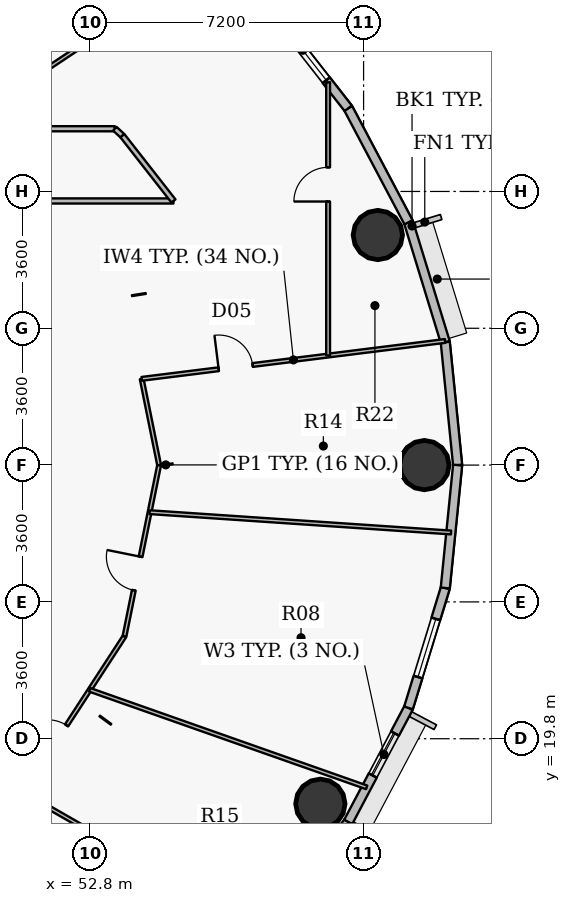
"""IFC4 building model, lengths in metres.
Left out: names, types, materials, properties, quantities, classifications, styles, units other than length and angle.
Written with IfcOpenShell. Run it as: python <this file> out.ifc"""

import sys

from ifc_helpers import new_model, si_unit, direction, frame, frame_2d, origin, origin_2d, place, context, subcontext, project, spatial, rectangle, hollow_circle, extrude, source, transform, mapped, element, fill, save


model = new_model("IFC4")
c1 = context("Model", 3, precision=1e-05, world=origin(), true_north=direction((0.0, 1.0)))
c2 = subcontext(c1, "Body", "Model", "MODEL_VIEW")
j1 = project(units=[si_unit("LENGTHUNIT", "METRE"), si_unit("PLANEANGLEUNIT", "RADIAN")], contexts=[c1])
p1 = place(None, origin())
s1 = spatial("IfcSite", under=j1, at=p1, CompositionType="ELEMENT")
p2 = place(p1, origin())
s2 = spatial("IfcBuilding", under=s1, at=p2, CompositionType="ELEMENT")
p3 = place(p2, frame((0.0, 0.0, 193.65)))
s3 = spatial("IfcBuildingStorey", under=s2, at=p3, CompositionType="ELEMENT", Elevation=193.65)
for number, where, z_axis, x_axis in (
    (1, (61.6, 27.0, 0.0), (0.0, 0.0, 1.0), (1.0, 0.0, 0.0)),
    (2, (60.375, 33.053, 0.0), (0.0, 0.0, 1.0), (1.0, 0.0, 0.0)),
    (3, (58.863, 18.089, 0.0), (0.0, 0.0, 1.0), (1.0, 0.0, 0.0)),
):
    element("IfcColumn", number, at=place(p3, frame(where, z_axis=z_axis, x_axis=x_axis)), inside=s3, PredefinedType="COLUMN", context=c2, shape_type="SweptSolid", body=[
        extrude(hollow_circle(Radius=0.65, WallThickness=0.04, at=origin_2d()), origin(), (0.0, 0.0, 1.0), 3.75),
    ])
p4 = place(p3, frame((62.15, 30.234, 0.0), z_axis=(0.0, 0.0, 1.0), x_axis=(0.100061534614, -0.994981250723, 0.0)))
e4 = element("IfcWall", 4, at=p4, inside=s3, PredefinedType="SOLIDWALL", context=c2, shape_type="SweptSolid", body=[
    extrude(rectangle(XDim=3.25, YDim=0.24, at=frame_2d((1.625, 0.0))), origin(), (0.0, 0.0, 1.0), 3.5),
])
p5 = place(p3, frame((61.183, 33.389, 0.0), z_axis=(0.0, 0.0, 1.0), x_axis=(0.293097995113, -0.956082405058, 0.0)))
e5 = element("IfcWall", 5, at=p5, inside=s3, PredefinedType="SOLIDWALL", context=c2, shape_type="SweptSolid", body=[
    extrude(rectangle(XDim=3.3, YDim=0.24, at=frame_2d((1.65, 0.0))), origin(), (0.0, 0.0, 1.0), 3.5),
])
p6 = place(p3, frame((59.596, 36.388, 0.0), z_axis=(0.0, 0.0, 1.0), x_axis=(0.467586874938, -0.88394712194, 0.0)))
e6 = element("IfcWall", 6, at=p6, inside=s3, PredefinedType="SOLIDWALL", context=c2, shape_type="SweptSolid", body=[
    extrude(rectangle(XDim=3.393, YDim=0.24, at=frame_2d((1.697, 0.0))), origin(), (0.0, 0.0, 1.0), 3.5),
])
p7 = place(p3, frame((57.428, 39.158, 0.0), z_axis=(0.0, 0.0, 1.0), x_axis=(0.616287674549, -0.787521112224, 0.0)))
e7 = element("IfcWall", 7, at=p7, inside=s3, PredefinedType="SOLIDWALL", context=c2, shape_type="SweptSolid", body=[
    extrude(rectangle(XDim=3.517, YDim=0.24, at=frame_2d((1.759, 0.0))), origin(), (0.0, 0.0, 1.0), 3.5),
])
p8 = place(p7, frame((0.579, 0.0, 0.9)))
e8 = element("IfcOpeningElement", 8, at=p8, cuts=e7, PredefinedType="OPENING", context=c2, shape_type="SweptSolid", body=[
    extrude(rectangle(XDim=2.0, YDim=1.75, at=origin_2d()), frame((1.0, 0.13, 0.875), z_axis=(0.0, -1.0, 0.0), x_axis=(1.0, 0.0, 0.0)), (0.0, 0.0, 1.0), 0.26),
])
p9 = place(p3, frame((59.596, 17.612, 0.0), z_axis=(0.0, 0.0, 1.0), x_axis=(-0.616287674549, -0.787521112224, 0.0)))
e9 = element("IfcWall", 9, at=p9, inside=s3, PredefinedType="SOLIDWALL", context=c2, shape_type="SweptSolid", body=[
    extrude(rectangle(XDim=3.517, YDim=0.24, at=frame_2d((1.759, 0.0))), origin(), (0.0, 0.0, 1.0), 3.5),
])
p10 = place(p3, frame((61.183, 20.611, 0.0), z_axis=(0.0, 0.0, 1.0), x_axis=(-0.467586874938, -0.88394712194, 0.0)))
e10 = element("IfcWall", 10, at=p10, inside=s3, PredefinedType="SOLIDWALL", context=c2, shape_type="SweptSolid", body=[
    extrude(rectangle(XDim=3.393, YDim=0.24, at=frame_2d((1.697, 0.0))), origin(), (0.0, 0.0, 1.0), 3.5),
])
p11 = place(p10, frame((0.762, 0.0, 0.9)))
e11 = element("IfcOpeningElement", 11, at=p11, cuts=e10, PredefinedType="OPENING", context=c2, shape_type="SweptSolid", body=[
    extrude(rectangle(XDim=1.25, YDim=1.65, at=origin_2d()), frame((0.625, 0.13, 0.825), z_axis=(0.0, -1.0, 0.0), x_axis=(1.0, 0.0, 0.0)), (0.0, 0.0, 1.0), 0.26),
])
p12 = place(p3, frame((62.15, 23.766, 0.0), z_axis=(0.0, 0.0, 1.0), x_axis=(-0.293097995113, -0.956082405058, 0.0)))
e12 = element("IfcWall", 12, at=p12, inside=s3, PredefinedType="SOLIDWALL", context=c2, shape_type="SweptSolid", body=[
    extrude(rectangle(XDim=3.3, YDim=0.24, at=frame_2d((1.65, 0.0))), origin(), (0.0, 0.0, 1.0), 3.5),
])
p13 = place(p12, frame((0.85, 0.0, 0.9)))
e13 = element("IfcOpeningElement", 13, at=p13, cuts=e12, PredefinedType="OPENING", context=c2, shape_type="SweptSolid", body=[
    extrude(rectangle(XDim=1.6, YDim=1.75, at=origin_2d()), frame((0.8, 0.13, 0.875), z_axis=(0.0, -1.0, 0.0), x_axis=(1.0, 0.0, 0.0)), (0.0, 0.0, 1.0), 0.26),
])
p14 = place(p3, frame((62.475, 27.0, 0.0), z_axis=(0.0, 0.0, 1.0), x_axis=(-0.100061534614, -0.994981250723, 0.0)))
e14 = element("IfcWall", 14, at=p14, inside=s3, PredefinedType="SOLIDWALL", context=c2, shape_type="SweptSolid", body=[
    extrude(rectangle(XDim=3.25, YDim=0.24, at=frame_2d((1.625, 0.0))), origin(), (0.0, 0.0, 1.0), 3.5),
])
p15 = place(p3, frame((38.541, 35.85, 0.0), z_axis=(0.0, 0.0, 1.0), x_axis=(1.0, 0.0, 0.0)))
e15 = element("IfcWall", 15, at=p15, inside=s3, PredefinedType="PARTITIONING", context=c2, shape_type="SweptSolid", body=[
    extrude(rectangle(XDim=14.913, YDim=0.135, at=frame_2d((7.456, 0.0))), origin(), (0.0, 0.0, 1.0), 2.935),
])
p16 = place(p15, frame((9.46, 0.0, 0.0)))
e16 = element("IfcOpeningElement", 16, at=p16, cuts=e15, PredefinedType="OPENING", context=c2, shape_type="SweptSolid", body=[
    extrude(rectangle(XDim=1.0, YDim=2.15, at=origin_2d()), frame((0.5, 0.078, 1.075), z_axis=(0.0, -1.0, 0.0), x_axis=(1.0, 0.0, 0.0)), (0.0, 0.0, 1.0), 0.155),
])
p17 = place(p3, frame((44.571, 18.15, 0.0), z_axis=(0.0, 0.0, 1.0), x_axis=(0.695670435579, -0.718361082647, 0.0)))
e17 = element("IfcWall", 17, at=p17, inside=s3, PredefinedType="PARTITIONING", context=c2, shape_type="SweptSolid", body=[
    extrude(rectangle(XDim=10.63, YDim=0.135, at=frame_2d((5.315, 0.0))), origin(), (0.0, 0.0, 1.0), 2.935),
])
p18 = place(p3, frame((45.8, 33.95, 0.0), z_axis=(0.0, 0.0, 1.0), x_axis=(1.0, 0.0, 0.0)))
e18 = element("IfcWall", 18, at=p18, inside=s3, PredefinedType="PARTITIONING", context=c2, shape_type="SweptSolid", body=[
    extrude(rectangle(XDim=9.197, YDim=0.135, at=frame_2d((4.599, 0.0))), origin(), (0.0, 0.0, 1.0), 3.5),
])
p19 = place(p3, frame((50.06, 36.356, 0.0), z_axis=(0.0, 0.0, 1.0), x_axis=(0.832520763353, 0.553993843455, 0.0)))
e19 = element("IfcWall", 19, at=p19, inside=s3, PredefinedType="PARTITIONING", context=c2, shape_type="SweptSolid", body=[
    extrude(rectangle(XDim=7.26, YDim=0.1, at=frame_2d((3.63, 0.0))), origin(), (0.0, 0.0, 1.0), 2.935),
])
p20 = place(p19, frame((3.18, 0.0, 0.0)))
e20 = element("IfcOpeningElement", 20, at=p20, cuts=e19, PredefinedType="OPENING", context=c2, shape_type="SweptSolid", body=[
    extrude(rectangle(XDim=0.9, YDim=2.1, at=origin_2d()), frame((0.45, 0.06, 1.05), z_axis=(0.0, -1.0, 0.0), x_axis=(1.0, 0.0, 0.0)), (0.0, 0.0, 1.0), 0.12),
])
p21 = place(p3, frame((51.017, 18.393, 0.0), z_axis=(0.0, 0.0, 1.0), x_axis=(0.867591997953, -0.497276708773, 0.0)))
e21 = element("IfcWall", 21, at=p21, inside=s3, PredefinedType="PARTITIONING", context=c2, shape_type="SweptSolid", body=[
    extrude(rectangle(XDim=7.3, YDim=0.1, at=frame_2d((3.65, 0.0))), origin(), (0.0, 0.0, 1.0), 2.935),
])
p22 = place(p3, frame((51.064, 18.429, 0.0), z_axis=(0.0, 0.0, 1.0), x_axis=(0.545382906853, 0.838187022634, 0.0)))
e22 = element("IfcWall", 22, at=p22, inside=s3, PredefinedType="PARTITIONING", context=c2, shape_type="SweptSolid", body=[
    extrude(rectangle(XDim=4.849, YDim=0.1, at=frame_2d((2.425, 0.0))), origin(), (0.0, 0.0, 1.0), 2.935),
])
p23 = place(p22, frame((1.155, 0.0, 0.0)))
e23 = element("IfcOpeningElement", 23, at=p23, cuts=e22, PredefinedType="OPENING", context=c2, shape_type="SweptSolid", body=[
    extrude(rectangle(XDim=0.9, YDim=2.1, at=origin_2d()), frame((0.45, 0.06, 1.05), z_axis=(0.0, -1.0, 0.0), x_axis=(1.0, 0.0, 0.0)), (0.0, 0.0, 1.0), 0.12),
])
p24 = place(p3, frame((52.793, 21.087, 0.0), z_axis=(0.0, 0.0, 1.0), x_axis=(0.94322572083, -0.33215243423, 0.0)))
e24 = element("IfcWall", 24, at=p24, inside=s3, PredefinedType="PARTITIONING", context=c2, shape_type="SweptSolid", body=[
    extrude(rectangle(XDim=7.728, YDim=0.1, at=frame_2d((3.864, 0.0))), origin(), (0.0, 0.0, 1.0), 2.935),
])
p25 = place(p3, frame((53.454, 35.85, 0.0), z_axis=(0.0, 0.0, 1.0), x_axis=(0.736667385572, -0.676255249913, 0.0)))
e25 = element("IfcWall", 25, at=p25, inside=s3, PredefinedType="PARTITIONING", context=c2, shape_type="SweptSolid", body=[
    extrude(rectangle(XDim=0.271, YDim=0.135, at=frame_2d((0.135, 0.0))), origin(), (0.0, 0.0, 1.0), 3.5),
])
p26 = place(p3, frame((53.653, 35.667, 0.0), z_axis=(0.0, 0.0, 1.0), x_axis=(0.616302223209, -0.787509726713, 0.0)))
e26 = element("IfcWall", 26, at=p26, inside=s3, PredefinedType="PARTITIONING", context=c2, shape_type="SweptSolid", body=[
    extrude(rectangle(XDim=2.18, YDim=0.135, at=frame_2d((1.09, 0.0))), origin(), (0.0, 0.0, 1.0), 3.5),
])
p27 = place(p3, frame((53.709, 22.494, 0.0), z_axis=(0.0, 0.0, 1.0), x_axis=(0.19825018224, 0.980151450155, 0.0)))
e27 = element("IfcWall", 27, at=p27, inside=s3, PredefinedType="PARTITIONING", context=c2, shape_type="SweptSolid", body=[
    extrude(rectangle(XDim=4.597, YDim=0.1, at=frame_2d((2.299, 0.0))), origin(), (0.0, 0.0, 1.0), 2.935),
])
p28 = place(p27, frame((1.237, 0.0, 0.0)))
e28 = element("IfcOpeningElement", 28, at=p28, cuts=e27, PredefinedType="OPENING", context=c2, shape_type="SweptSolid", body=[
    extrude(rectangle(XDim=0.9, YDim=2.1, at=origin_2d()), frame((0.45, 0.06, 1.05), z_axis=(0.0, -1.0, 0.0), x_axis=(1.0, 0.0, 0.0)), (0.0, 0.0, 1.0), 0.12),
])
p29 = place(p3, frame((54.161, 29.269, 0.0), z_axis=(0.0, 0.0, 1.0), x_axis=(0.198265432228, -0.980148365495, 0.0)))
e29 = element("IfcWall", 29, at=p29, inside=s3, PredefinedType="PARTITIONING", context=c2, shape_type="SweptSolid", body=[
    extrude(rectangle(XDim=2.315, YDim=0.1, at=frame_2d((1.157, 0.0))), origin(), (0.0, 0.0, 1.0), 2.935),
])
p30 = place(p3, frame((54.161, 29.269, 0.0), z_axis=(0.0, 0.0, 1.0), x_axis=(0.99228860955, 0.123948841697, 0.0)))
e30 = element("IfcWall", 30, at=p30, inside=s3, PredefinedType="PARTITIONING", context=c2, shape_type="SweptSolid", body=[
    extrude(rectangle(XDim=8.046, YDim=0.1, at=frame_2d((4.023, 0.0))), origin(), (0.0, 0.0, 1.0), 2.935),
])
p31 = place(p30, frame((2.042, 0.0, 0.0)))
e31 = element("IfcOpeningElement", 31, at=p31, cuts=e30, PredefinedType="OPENING", context=c2, shape_type="SweptSolid", body=[
    extrude(rectangle(XDim=0.9, YDim=2.1, at=origin_2d()), frame((0.45, 0.06, 1.05), z_axis=(0.0, -1.0, 0.0), x_axis=(1.0, 0.0, 0.0)), (0.0, 0.0, 1.0), 0.12),
])
p32 = place(p3, frame((54.369, 25.761, 0.0), z_axis=(0.0, 0.0, 1.0), x_axis=(0.99773610993, -0.06725068729, 0.0)))
e32 = element("IfcWall", 32, at=p32, inside=s3, PredefinedType="PARTITIONING", context=c2, shape_type="SweptSolid", body=[
    extrude(rectangle(XDim=7.95, YDim=0.1, at=frame_2d((3.975, 0.0))), origin(), (0.0, 0.0, 1.0), 2.935),
])
p33 = place(p3, frame((59.067, 29.882, 0.0), z_axis=(0.0, 0.0, 1.0), x_axis=(0.0, 1.0, 0.0)))
e33 = element("IfcWall", 33, at=p33, inside=s3, PredefinedType="PARTITIONING", context=c2, shape_type="SweptSolid", body=[
    extrude(rectangle(XDim=7.191, YDim=0.1, at=frame_2d((3.596, 0.0))), origin(), (0.0, 0.0, 1.0), 2.935),
])
p34 = place(p33, frame((4.053, 0.0, 0.0)))
e34 = element("IfcOpeningElement", 34, at=p34, cuts=e33, PredefinedType="OPENING", context=c2, shape_type="SweptSolid", body=[
    extrude(rectangle(XDim=0.9, YDim=2.1, at=origin_2d()), frame((0.45, 0.06, 1.05), z_axis=(0.0, -1.0, 0.0), x_axis=(1.0, 0.0, 0.0)), (0.0, 0.0, 1.0), 0.12),
])
m1 = source(origin(), c2, "Body", "SweptSolid", [
    extrude(rectangle(XDim=2.0, YDim=1.75, at=origin_2d()), frame((1.0, 0.03, 0.875), z_axis=(0.0, -1.0, 0.0), x_axis=(1.0, 0.0, 0.0)), (0.0, 0.0, 1.0), 0.06),
])
p35 = place(p8, origin())
e35 = element("IfcWindow", 35, at=p35, inside=s3, PartitioningType="DOUBLE_PANEL_VERTICAL", PredefinedType="WINDOW", context=c2, shape_type="MappedRepresentation", body=[
    mapped(m1, transform((0.0, 0.0, 0.0), x_axis=(1.0, 0.0, 0.0), y_axis=(0.0, 1.0, 0.0), z_axis=(0.0, 0.0, 1.0), scale=1.0)),
])
fill(e8, e35)
m2 = source(origin(), c2, "Body", "SweptSolid", [
    extrude(rectangle(XDim=1.25, YDim=1.65, at=origin_2d()), frame((0.625, 0.03, 0.825), z_axis=(0.0, -1.0, 0.0), x_axis=(1.0, 0.0, 0.0)), (0.0, 0.0, 1.0), 0.06),
])
p36 = place(p11, origin())
e36 = element("IfcWindow", 36, at=p36, inside=s3, PartitioningType="SINGLE_PANEL", PredefinedType="WINDOW", context=c2, shape_type="MappedRepresentation", body=[
    mapped(m2, transform((0.0, 0.0, 0.0), x_axis=(1.0, 0.0, 0.0), y_axis=(0.0, 1.0, 0.0), z_axis=(0.0, 0.0, 1.0), scale=1.0)),
])
fill(e11, e36)
m3 = source(origin(), c2, "Body", "SweptSolid", [
    extrude(rectangle(XDim=1.6, YDim=1.75, at=origin_2d()), frame((0.8, 0.03, 0.875), z_axis=(0.0, -1.0, 0.0), x_axis=(1.0, 0.0, 0.0)), (0.0, 0.0, 1.0), 0.06),
])
p37 = place(p13, origin())
e37 = element("IfcWindow", 37, at=p37, inside=s3, PartitioningType="DOUBLE_PANEL_VERTICAL", PredefinedType="WINDOW", context=c2, shape_type="MappedRepresentation", body=[
    mapped(m3, transform((0.0, 0.0, 0.0), x_axis=(1.0, 0.0, 0.0), y_axis=(0.0, 1.0, 0.0), z_axis=(0.0, 0.0, 1.0), scale=1.0)),
])
fill(e13, e37)
m4 = source(origin(), c2, "Body", "SweptSolid", [
    extrude(rectangle(XDim=0.9, YDim=2.1, at=origin_2d()), frame((0.45, 0.025, 1.05), z_axis=(0.0, -1.0, 0.0), x_axis=(1.0, 0.0, 0.0)), (0.0, 0.0, 1.0), 0.05),
])
p38 = place(p23, origin())
e38 = element("IfcDoor", 38, at=p38, inside=s3, OperationType="SINGLE_SWING_LEFT", PredefinedType="DOOR", context=c2, shape_type="MappedRepresentation", body=[
    mapped(m4, transform((0.0, 0.0, 0.0), x_axis=(1.0, 0.0, 0.0), y_axis=(0.0, 1.0, 0.0), z_axis=(0.0, 0.0, 1.0), scale=1.0)),
])
fill(e23, e38)
p39 = place(p28, origin())
e39 = element("IfcDoor", 39, at=p39, inside=s3, OperationType="SINGLE_SWING_RIGHT", PredefinedType="DOOR", context=c2, shape_type="MappedRepresentation", body=[
    mapped(m4, transform((0.0, 0.0, 0.0), x_axis=(1.0, 0.0, 0.0), y_axis=(0.0, 1.0, 0.0), z_axis=(0.0, 0.0, 1.0), scale=1.0)),
])
fill(e28, e39)
p40 = place(p31, origin())
e40 = element("IfcDoor", 40, at=p40, inside=s3, OperationType="SINGLE_SWING_LEFT", PredefinedType="DOOR", context=c2, shape_type="MappedRepresentation", body=[
    mapped(m4, transform((0.0, 0.0, 0.0), x_axis=(1.0, 0.0, 0.0), y_axis=(0.0, 1.0, 0.0), z_axis=(0.0, 0.0, 1.0), scale=1.0)),
])
fill(e31, e40)
p41 = place(p34, origin())
e41 = element("IfcDoor", 41, at=p41, inside=s3, OperationType="SINGLE_SWING_LEFT", PredefinedType="DOOR", context=c2, shape_type="MappedRepresentation", body=[
    mapped(m4, transform((0.0, 0.0, 0.0), x_axis=(1.0, 0.0, 0.0), y_axis=(0.0, 1.0, 0.0), z_axis=(0.0, 0.0, 1.0), scale=1.0)),
])
fill(e34, e41)
save(model, sys.argv[1])
